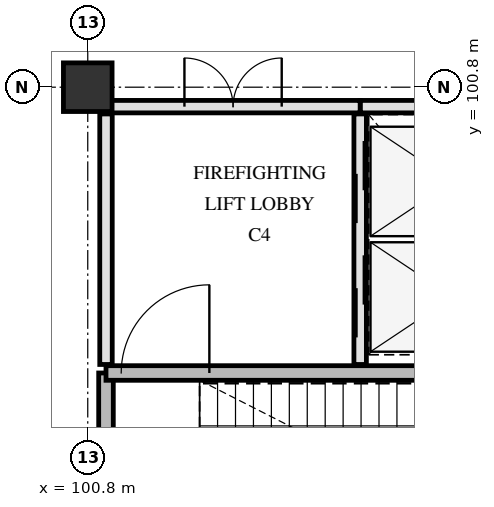
"""IFC4 building model, lengths in metres.
Left out: names, types, materials, properties, quantities, classifications, styles, units other than length and angle.
Written with IfcOpenShell. Run it as: python <this file> out.ifc"""

import sys

from ifc_helpers import new_model, si_unit, direction, frame, frame_2d, origin, origin_2d, place, context, subcontext, project, spatial, rectangle, extrude, element, fill, save


model = new_model("IFC4")
c1 = context("Model", 3, precision=1e-05, world=origin(), true_north=direction((0.0, 1.0)))
c2 = subcontext(c1, "Body", "Model", "MODEL_VIEW")
j1 = project(units=[si_unit("LENGTHUNIT", "METRE"), si_unit("PLANEANGLEUNIT", "RADIAN")], contexts=[c1])
p1 = place(None, origin())
s1 = spatial("IfcSite", under=j1, at=p1, CompositionType="ELEMENT")
p2 = place(p1, origin())
s2 = spatial("IfcBuilding", under=s1, at=p2, CompositionType="ELEMENT")
p3 = place(p2, frame((0.0, 0.0, 4.8)))
s3 = spatial("IfcBuildingStorey", under=s2, at=p3, CompositionType="ELEMENT", Elevation=4.8)
p4 = place(p3, frame((100.8, 100.8, 0.0), z_axis=(0.0, 0.0, 1.0), x_axis=(1.0, 0.0, 0.0)))
e1 = element("IfcColumn", 1, at=p4, inside=s3, PredefinedType="COLUMN", context=c2, shape_type="SweptSolid", body=[
    extrude(rectangle(XDim=0.8, YDim=0.8, at=origin_2d()), origin(), (0.0, 0.0, 1.0), 4.5),
])
p5 = place(p3, frame((101.1, 92.78, 0.0), z_axis=(0.0, 0.0, 1.0), x_axis=(0.0, 1.0, 0.0)))
e2 = element("IfcWall", 2, at=p5, inside=s3, PredefinedType="SHEAR", context=c2, shape_type="SweptSolid", body=[
    extrude(rectangle(XDim=3.32, YDim=0.24, at=frame_2d((1.66, 0.0))), origin(), (0.0, 0.0, 1.0), 4.15),
])
p6 = place(p3, frame((101.1, 96.1, 0.0), z_axis=(0.0, 0.0, 1.0), x_axis=(1.0, 0.0, 0.0)))
e3 = element("IfcWall", 3, at=p6, inside=s3, PredefinedType="SHEAR", context=c2, shape_type="SweptSolid", body=[
    extrude(rectangle(XDim=7.82, YDim=0.24, at=frame_2d((3.91, 0.0))), origin(), (0.0, 0.0, 1.0), 4.15),
])
p7 = place(p6, frame((0.25, 0.0, 0.0)))
e4 = element("IfcOpeningElement", 4, at=p7, cuts=e3, PredefinedType="OPENING", context=c2, shape_type="SweptSolid", body=[
    extrude(rectangle(XDim=1.45, YDim=2.2, at=frame_2d((0.725, 1.1))), frame((0.0, 0.13, 0.0), z_axis=(0.0, -1.0, 0.0), x_axis=(1.0, 0.0, 0.0)), (0.0, 0.0, 1.0), 0.26),
])
p8 = place(p3, frame((105.28, 96.24, 0.0), z_axis=(0.0, 0.0, 1.0), x_axis=(0.0, 1.0, 0.0)))
e5 = element("IfcWall", 5, at=p8, inside=s3, PredefinedType="PARTITIONING", context=c2, shape_type="SweptSolid", body=[
    extrude(rectangle(XDim=4.12, YDim=0.205, at=frame_2d((2.06, 0.0))), origin(), (0.0, 0.0, 1.0), 4.14),
])
p9 = place(p8, frame((0.445, 0.0, 0.0)))
e6 = element("IfcOpeningElement", 6, at=p9, cuts=e5, PredefinedType="OPENING", context=c2, shape_type="SweptSolid", body=[
    extrude(rectangle(XDim=1.35, YDim=2.2, at=frame_2d((0.675, 1.1))), frame((0.0, 0.113, 0.0), z_axis=(0.0, -1.0, 0.0), x_axis=(1.0, 0.0, 0.0)), (0.0, 0.0, 1.0), 0.225),
])
p10 = place(p8, frame((2.325, 0.0, 0.0)))
e7 = element("IfcOpeningElement", 7, at=p10, cuts=e5, PredefinedType="OPENING", context=c2, shape_type="SweptSolid", body=[
    extrude(rectangle(XDim=1.35, YDim=2.2, at=frame_2d((0.675, 1.1))), frame((0.0, 0.113, 0.0), z_axis=(0.0, -1.0, 0.0), x_axis=(1.0, 0.0, 0.0)), (0.0, 0.0, 1.0), 0.225),
])
p11 = place(p3, frame((105.28, 100.48, 0.0), z_axis=(0.0, 0.0, 1.0), x_axis=(1.0, 0.0, 0.0)))
e8 = element("IfcWall", 8, at=p11, inside=s3, PredefinedType="PARTITIONING", context=c2, shape_type="SweptSolid", body=[
    extrude(rectangle(XDim=3.57, YDim=0.205, at=frame_2d((1.785, 0.0))), origin(), (0.0, 0.0, 1.0), 3.54),
])
p12 = place(p3, frame((101.1, 96.24, 0.0), z_axis=(0.0, 0.0, 1.0), x_axis=(0.0, 1.0, 0.0)))
e9 = element("IfcWall", 9, at=p12, inside=s3, PredefinedType="PARTITIONING", context=c2, shape_type="SweptSolid", body=[
    extrude(rectangle(XDim=4.12, YDim=0.205, at=frame_2d((2.06, 0.0))), origin(), (0.0, 0.0, 1.0), 3.59),
])
p13 = place(p3, frame((101.1, 100.48, 0.0), z_axis=(0.0, 0.0, 1.0), x_axis=(1.0, 0.0, 0.0)))
e10 = element("IfcWall", 10, at=p13, inside=s3, PredefinedType="PARTITIONING", context=c2, shape_type="SweptSolid", body=[
    extrude(rectangle(XDim=4.18, YDim=0.205, at=frame_2d((2.09, 0.0))), origin(), (0.0, 0.0, 1.0), 3.54),
])
p14 = place(p13, frame((1.29, 0.0, 0.0)))
e11 = element("IfcOpeningElement", 11, at=p14, cuts=e10, PredefinedType="OPENING", context=c2, shape_type="SweptSolid", body=[
    extrude(rectangle(XDim=1.6, YDim=2.25, at=frame_2d((0.8, 1.125))), frame((0.0, 0.113, 0.0), z_axis=(0.0, -1.0, 0.0), x_axis=(1.0, 0.0, 0.0)), (0.0, 0.0, 1.0), 0.225),
])
p15 = place(p7, origin())
e12 = element("IfcDoor", 12, at=p15, inside=s3, OperationType="SINGLE_SWING_RIGHT", PredefinedType="DOOR", context=c2, shape_type="SweptSolid", body=[
    extrude(rectangle(XDim=1.45, YDim=2.2, at=frame_2d((0.725, 1.1))), frame((0.0, 0.025, 0.0), z_axis=(0.0, -1.0, 0.0), x_axis=(1.0, 0.0, 0.0)), (0.0, 0.0, 1.0), 0.05),
])
fill(e4, e12)
p16 = place(p9, origin())
e13 = element("IfcDoor", 13, at=p16, inside=s3, OperationType="SLIDING_TO_LEFT", PredefinedType="DOOR", context=c2, shape_type="SweptSolid", body=[
    extrude(rectangle(XDim=1.35, YDim=2.2, at=frame_2d((0.675, 1.1))), frame((0.0, 0.025, 0.0), z_axis=(0.0, -1.0, 0.0), x_axis=(1.0, 0.0, 0.0)), (0.0, 0.0, 1.0), 0.05),
])
fill(e6, e13)
p17 = place(p10, origin())
e14 = element("IfcDoor", 14, at=p17, inside=s3, OperationType="SLIDING_TO_LEFT", PredefinedType="DOOR", context=c2, shape_type="SweptSolid", body=[
    extrude(rectangle(XDim=1.35, YDim=2.2, at=frame_2d((0.675, 1.1))), frame((0.0, 0.025, 0.0), z_axis=(0.0, -1.0, 0.0), x_axis=(1.0, 0.0, 0.0)), (0.0, 0.0, 1.0), 0.05),
])
fill(e7, e14)
p18 = place(p14, origin())
e15 = element("IfcDoor", 15, at=p18, inside=s3, OperationType="DOUBLE_SWING_LEFT", PredefinedType="DOOR", context=c2, shape_type="SweptSolid", body=[
    extrude(rectangle(XDim=1.6, YDim=2.25, at=frame_2d((0.8, 1.125))), frame((0.0, 0.025, 0.0), z_axis=(0.0, -1.0, 0.0), x_axis=(1.0, 0.0, 0.0)), (0.0, 0.0, 1.0), 0.05),
])
fill(e11, e15)
save(model, sys.argv[1])
